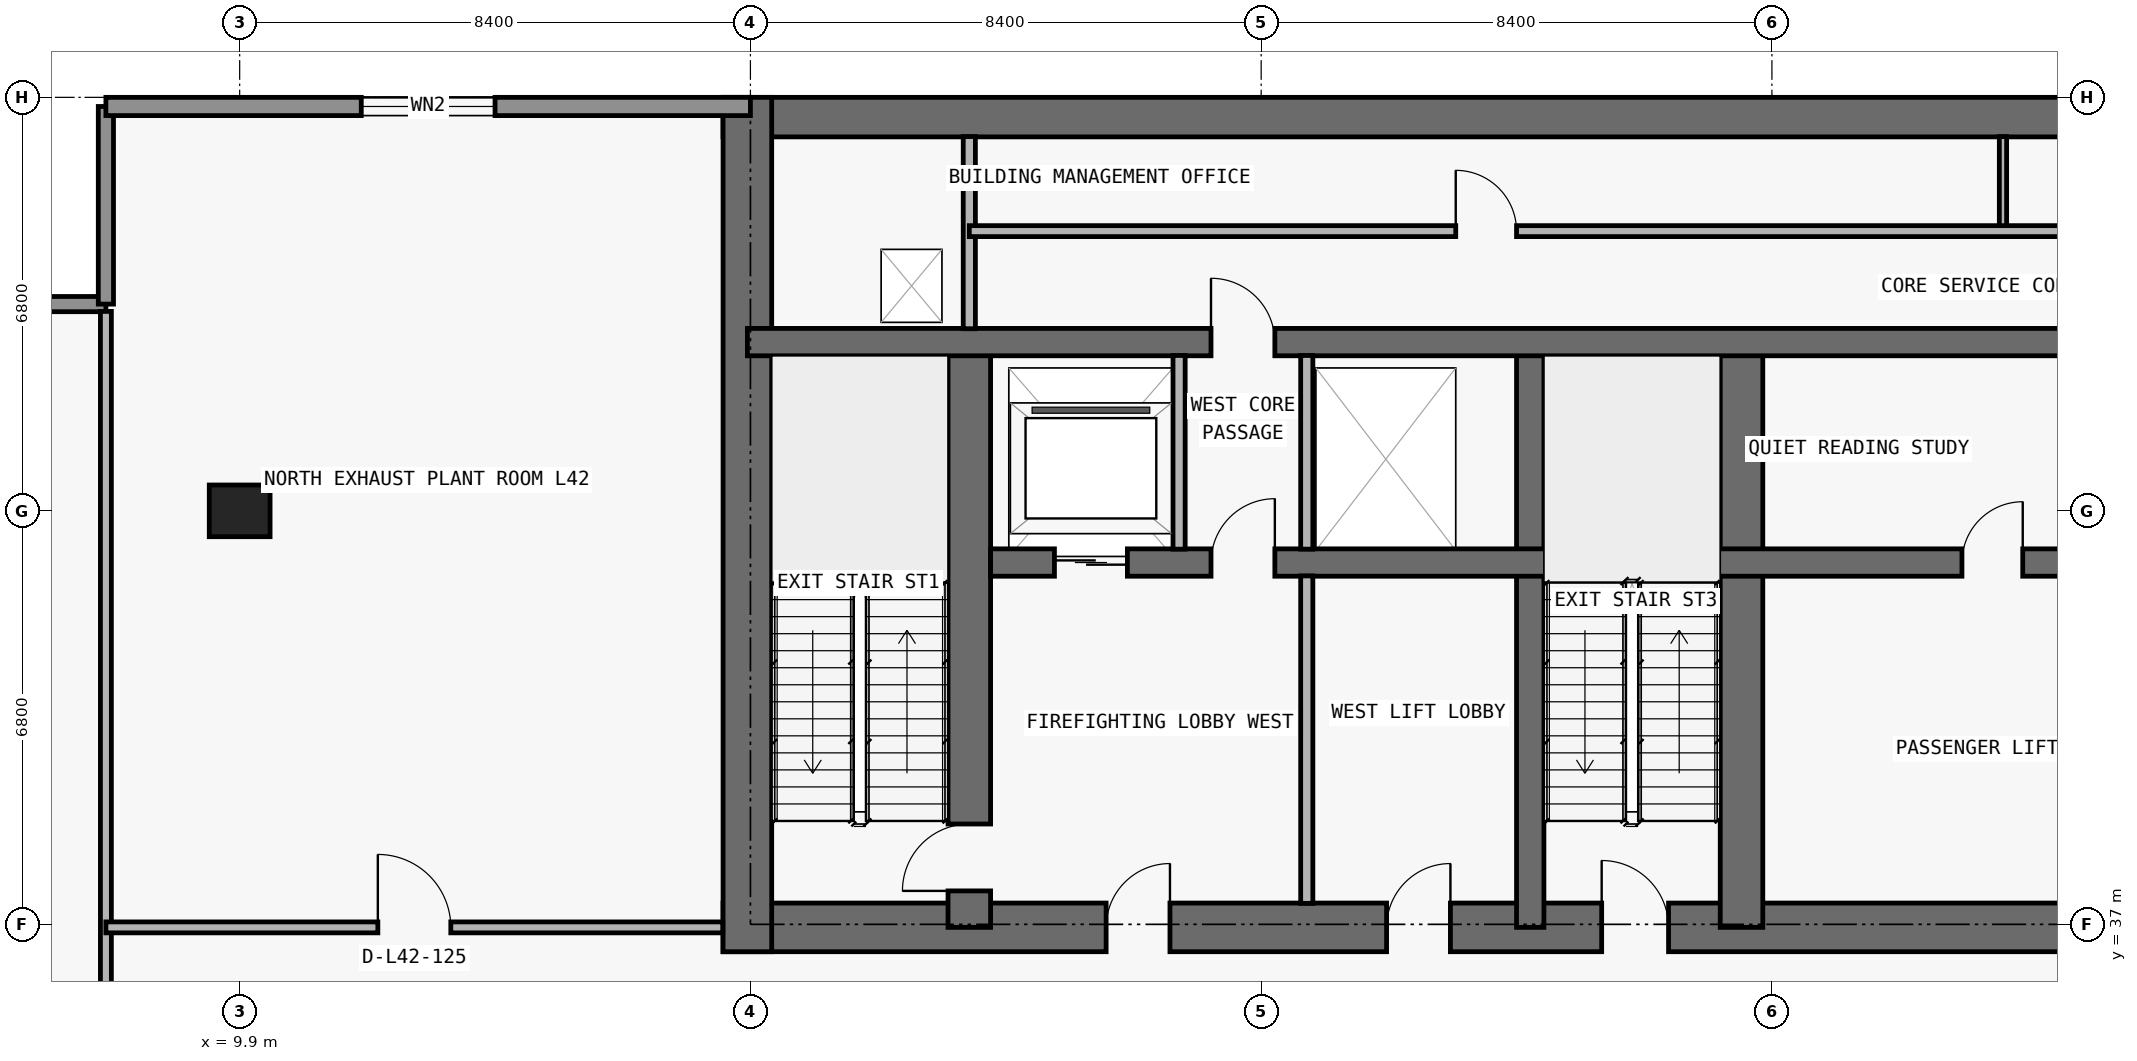
"""IFC4 building model, lengths in metres.
Left out: names, types, materials, properties, quantities, classifications, styles, units other than length and angle.
Written with IfcOpenShell. Run it as: python <this file> out.ifc"""

import sys

from ifc_helpers import new_model, si_unit, direction, frame, frame_2d, origin, origin_2d, place, context, subcontext, project, spatial, rectangle, extrude, element, fill, save


model = new_model("IFC4")
c1 = context("Model", 3, precision=1e-05, world=origin(), true_north=direction((0.0, 1.0)))
c2 = subcontext(c1, "Body", "Model", "MODEL_VIEW")
j1 = project(units=[si_unit("LENGTHUNIT", "METRE"), si_unit("PLANEANGLEUNIT", "RADIAN")], contexts=[c1])
p1 = place(None, origin())
s1 = spatial("IfcSite", under=j1, at=p1, CompositionType="ELEMENT")
p2 = place(p1, origin())
s2 = spatial("IfcBuilding", under=s1, at=p2, CompositionType="ELEMENT")
p3 = place(p2, frame((0.0, 0.0, 152.1)))
s3 = spatial("IfcBuildingStorey", under=s2, at=p3, CompositionType="ELEMENT", Elevation=152.1)
p4 = place(p3, frame((9.9, 43.8, 0.0), z_axis=(0.0, 0.0, 1.0), x_axis=(1.0, 0.0, 0.0)))
e1 = element("IfcColumn", 1, at=p4, inside=s3, PredefinedType="COLUMN", context=c2, shape_type="SweptSolid", body=[
    extrude(rectangle(XDim=1.0, YDim=0.85, at=origin_2d()), origin(), (0.0, 0.0, 1.0), 4.85),
])
p5 = place(p3, frame((17.85, 36.95, 0.0), z_axis=(0.0, 0.0, 1.0), x_axis=(1.0, 0.0, 0.0)))
e2 = element("IfcWall", 2, at=p5, inside=s3, PredefinedType="SHEAR", context=c2, shape_type="SweptSolid", body=[
    extrude(rectangle(XDim=42.1, YDim=0.8, at=frame_2d((21.05, 0.0))), origin(), (0.0, 0.0, 1.0), 4.85),
])
p6 = place(p5, frame((14.45, 0.0, 0.0)))
e3 = element("IfcOpeningElement", 3, at=p6, cuts=e2, PredefinedType="OPENING", context=c2, shape_type="SweptSolid", body=[
    extrude(rectangle(XDim=1.1, YDim=2.15, at=frame_2d((0.55, 1.075))), frame((0.0, 0.41, 0.0), z_axis=(0.0, -1.0, 0.0), x_axis=(1.0, 0.0, 0.0)), (0.0, 0.0, 1.0), 0.82),
])
p7 = place(p5, frame((6.3, 0.0, 0.0)))
e4 = element("IfcOpeningElement", 4, at=p7, cuts=e2, PredefinedType="OPENING", context=c2, shape_type="SweptSolid", body=[
    extrude(rectangle(XDim=1.05, YDim=2.15, at=frame_2d((0.525, 1.075))), frame((0.0, 0.41, 0.0), z_axis=(0.0, -1.0, 0.0), x_axis=(1.0, 0.0, 0.0)), (0.0, 0.0, 1.0), 0.82),
])
p8 = place(p5, frame((34.8, 0.0, 0.0)))
e5 = element("IfcOpeningElement", 5, at=p8, cuts=e2, PredefinedType="OPENING", context=c2, shape_type="SweptSolid", body=[
    extrude(rectangle(XDim=1.05, YDim=2.15, at=frame_2d((0.525, 1.075))), frame((0.0, 0.41, 0.0), z_axis=(0.0, -1.0, 0.0), x_axis=(1.0, 0.0, 0.0)), (0.0, 0.0, 1.0), 0.82),
])
p9 = place(p5, frame((10.913, 0.0, 0.0)))
e6 = element("IfcOpeningElement", 6, at=p9, cuts=e2, PredefinedType="OPENING", context=c2, shape_type="SweptSolid", body=[
    extrude(rectangle(XDim=1.05, YDim=2.15, at=frame_2d((0.525, 1.075))), frame((0.0, 0.41, 0.0), z_axis=(0.0, -1.0, 0.0), x_axis=(1.0, 0.0, 0.0)), (0.0, 0.0, 1.0), 0.82),
])
p10 = place(p5, frame((24.15, 0.0, 0.0)))
e7 = element("IfcOpeningElement", 7, at=p10, cuts=e2, PredefinedType="OPENING", context=c2, shape_type="SweptSolid", body=[
    extrude(rectangle(XDim=1.05, YDim=2.15, at=frame_2d((0.525, 1.075))), frame((0.0, 0.41, 0.0), z_axis=(0.0, -1.0, 0.0), x_axis=(1.0, 0.0, 0.0)), (0.0, 0.0, 1.0), 0.82),
])
p11 = place(p3, frame((17.85, 50.275, 0.0), z_axis=(0.0, 0.0, 1.0), x_axis=(1.0, 0.0, 0.0)))
e8 = element("IfcWall", 8, at=p11, inside=s3, PredefinedType="SHEAR", context=c2, shape_type="SweptSolid", body=[
    extrude(rectangle(XDim=42.1, YDim=0.65, at=frame_2d((21.05, 0.0))), origin(), (0.0, 0.0, 1.0), 4.85),
])
p12 = place(p3, frame((18.25, 36.55, 0.0), z_axis=(0.0, 0.0, 1.0), x_axis=(0.0, 1.0, 0.0)))
e9 = element("IfcWall", 9, at=p12, inside=s3, PredefinedType="SHEAR", context=c2, shape_type="SweptSolid", body=[
    extrude(rectangle(XDim=14.05, YDim=0.8, at=frame_2d((7.025, 0.0))), origin(), (0.0, 0.0, 1.0), 4.85),
])
p13 = place(p3, frame((21.9, 36.95, 0.0), z_axis=(0.0, 0.0, 1.0), x_axis=(0.0, 1.0, 0.0)))
e10 = element("IfcWall", 10, at=p13, inside=s3, PredefinedType="SHEAR", context=c2, shape_type="SweptSolid", body=[
    extrude(rectangle(XDim=9.625, YDim=0.7, at=frame_2d((4.812, 0.0))), origin(), (0.0, 0.0, 1.0), 4.85),
])
p14 = place(p13, frame((0.6, 0.0, 0.0)))
e11 = element("IfcOpeningElement", 11, at=p14, cuts=e10, PredefinedType="OPENING", context=c2, shape_type="SweptSolid", body=[
    extrude(rectangle(XDim=1.1, YDim=2.15, at=frame_2d((0.55, 1.075))), frame((0.0, 0.36, 0.0), z_axis=(0.0, -1.0, 0.0), x_axis=(1.0, 0.0, 0.0)), (0.0, 0.0, 1.0), 0.72),
])
p15 = place(p3, frame((31.125, 36.95, 0.0), z_axis=(0.0, 0.0, 1.0), x_axis=(0.0, 1.0, 0.0)))
e12 = element("IfcWall", 12, at=p15, inside=s3, PredefinedType="SHEAR", context=c2, shape_type="SweptSolid", body=[
    extrude(rectangle(XDim=9.625, YDim=0.45, at=frame_2d((4.812, 0.0))), origin(), (0.0, 0.0, 1.0), 4.85),
])
p16 = place(p3, frame((34.6, 36.95, 0.0), z_axis=(0.0, 0.0, 1.0), x_axis=(0.0, 1.0, 0.0)))
e13 = element("IfcWall", 13, at=p16, inside=s3, PredefinedType="SHEAR", context=c2, shape_type="SweptSolid", body=[
    extrude(rectangle(XDim=9.625, YDim=0.7, at=frame_2d((4.812, 0.0))), origin(), (0.0, 0.0, 1.0), 4.85),
])
p17 = place(p3, frame((22.25, 42.95, 0.0), z_axis=(0.0, 0.0, 1.0), x_axis=(1.0, 0.0, 0.0)))
e14 = element("IfcWall", 14, at=p17, inside=s3, PredefinedType="SHEAR", context=c2, shape_type="SweptSolid", body=[
    extrude(rectangle(XDim=33.3, YDim=0.45, at=frame_2d((16.65, 0.0))), origin(), (0.0, 0.0, 1.0), 4.85),
])
p18 = place(p17, frame((1.05, 0.0, 0.0)))
e15 = element("IfcOpeningElement", 15, at=p18, cuts=e14, PredefinedType="OPENING", context=c2, shape_type="SweptSolid", body=[
    extrude(rectangle(XDim=1.2, YDim=2.2, at=frame_2d((0.6, 1.1))), frame((0.0, 0.235, 0.0), z_axis=(0.0, -1.0, 0.0), x_axis=(1.0, 0.0, 0.0)), (0.0, 0.0, 1.0), 0.47),
])
p19 = place(p17, frame((31.05, 0.0, 0.0)))
e16 = element("IfcOpeningElement", 16, at=p19, cuts=e14, PredefinedType="OPENING", context=c2, shape_type="SweptSolid", body=[
    extrude(rectangle(XDim=1.2, YDim=2.2, at=frame_2d((0.6, 1.1))), frame((0.0, 0.235, 0.0), z_axis=(0.0, -1.0, 0.0), x_axis=(1.0, 0.0, 0.0)), (0.0, 0.0, 1.0), 0.47),
])
p20 = place(p17, frame((21.4, 0.0, 0.0)))
e17 = element("IfcOpeningElement", 17, at=p20, cuts=e14, PredefinedType="OPENING", context=c2, shape_type="SweptSolid", body=[
    extrude(rectangle(XDim=1.1, YDim=2.2, at=frame_2d((0.55, 1.1))), frame((0.0, 0.235, 0.0), z_axis=(0.0, -1.0, 0.0), x_axis=(1.0, 0.0, 0.0)), (0.0, 0.0, 1.0), 0.47),
])
p21 = place(p17, frame((24.0, 0.0, 0.0)))
e18 = element("IfcOpeningElement", 18, at=p21, cuts=e14, PredefinedType="OPENING", context=c2, shape_type="SweptSolid", body=[
    extrude(rectangle(XDim=1.1, YDim=2.2, at=frame_2d((0.55, 1.1))), frame((0.0, 0.235, 0.0), z_axis=(0.0, -1.0, 0.0), x_axis=(1.0, 0.0, 0.0)), (0.0, 0.0, 1.0), 0.47),
])
p22 = place(p17, frame((3.625, 0.0, 0.0)))
e19 = element("IfcOpeningElement", 19, at=p22, cuts=e14, PredefinedType="OPENING", context=c2, shape_type="SweptSolid", body=[
    extrude(rectangle(XDim=1.05, YDim=2.15, at=frame_2d((0.525, 1.075))), frame((0.0, 0.235, 0.0), z_axis=(0.0, -1.0, 0.0), x_axis=(1.0, 0.0, 0.0)), (0.0, 0.0, 1.0), 0.47),
])
p23 = place(p17, frame((28.675, 0.0, 0.0)))
e20 = element("IfcOpeningElement", 20, at=p23, cuts=e14, PredefinedType="OPENING", context=c2, shape_type="SweptSolid", body=[
    extrude(rectangle(XDim=1.05, YDim=2.15, at=frame_2d((0.525, 1.075))), frame((0.0, 0.235, 0.0), z_axis=(0.0, -1.0, 0.0), x_axis=(1.0, 0.0, 0.0)), (0.0, 0.0, 1.0), 0.47),
])
p24 = place(p17, frame((15.975, 0.0, 0.0)))
e21 = element("IfcOpeningElement", 21, at=p24, cuts=e14, PredefinedType="OPENING", context=c2, shape_type="SweptSolid", body=[
    extrude(rectangle(XDim=1.0, YDim=2.2, at=frame_2d((0.5, 1.1))), frame((0.0, 0.235, 0.0), z_axis=(0.0, -1.0, 0.0), x_axis=(1.0, 0.0, 0.0)), (0.0, 0.0, 1.0), 0.47),
])
p25 = place(p3, frame((18.25, 46.575, 0.0), z_axis=(0.0, 0.0, 1.0), x_axis=(1.0, 0.0, 0.0)))
e22 = element("IfcWall", 22, at=p25, inside=s3, PredefinedType="SHEAR", context=c2, shape_type="SweptSolid", body=[
    extrude(rectangle(XDim=41.3, YDim=0.45, at=frame_2d((20.65, 0.0))), origin(), (0.0, 0.0, 1.0), 4.85),
])
p26 = place(p25, frame((7.625, 0.0, 0.0)))
e23 = element("IfcOpeningElement", 23, at=p26, cuts=e22, PredefinedType="OPENING", context=c2, shape_type="SweptSolid", body=[
    extrude(rectangle(XDim=1.05, YDim=2.15, at=frame_2d((0.525, 1.075))), frame((0.0, 0.235, 0.0), z_axis=(0.0, -1.0, 0.0), x_axis=(1.0, 0.0, 0.0)), (0.0, 0.0, 1.0), 0.47),
])
p27 = place(p25, frame((32.675, 0.0, 0.0)))
e24 = element("IfcOpeningElement", 24, at=p27, cuts=e22, PredefinedType="OPENING", context=c2, shape_type="SweptSolid", body=[
    extrude(rectangle(XDim=1.05, YDim=2.15, at=frame_2d((0.525, 1.075))), frame((0.0, 0.235, 0.0), z_axis=(0.0, -1.0, 0.0), x_axis=(1.0, 0.0, 0.0)), (0.0, 0.0, 1.0), 0.47),
])
p28 = place(p3, frame((4.05, 47.2, 0.0), z_axis=(0.0, 0.0, 1.0), x_axis=(1.0, 0.0, 0.0)))
e25 = element("IfcWall", 25, at=p28, inside=s3, PredefinedType="ELEMENTEDWALL", context=c2, shape_type="SweptSolid", body=[
    extrude(rectangle(XDim=3.65, YDim=0.25, at=frame_2d((1.825, 0.0))), origin(), (0.0, 0.0, 1.0), 4.85),
])
p29 = place(p3, frame((7.7, 47.2, 0.0), z_axis=(0.0, 0.0, 1.0), x_axis=(0.0, 1.0, 0.0)))
e26 = element("IfcWall", 26, at=p29, inside=s3, PredefinedType="ELEMENTEDWALL", context=c2, shape_type="SweptSolid", body=[
    extrude(rectangle(XDim=3.25, YDim=0.25, at=frame_2d((1.625, 0.0))), origin(), (0.0, 0.0, 1.0), 4.85),
])
p30 = place(p3, frame((7.7, 50.45, 0.0), z_axis=(0.0, 0.0, 1.0), x_axis=(1.0, 0.0, 0.0)))
e27 = element("IfcWall", 27, at=p30, inside=s3, PredefinedType="STANDARD", context=c2, shape_type="SweptSolid", body=[
    extrude(rectangle(XDim=10.6, YDim=0.3, at=frame_2d((5.3, 0.0))), origin(), (0.0, 0.0, 1.0), 4.85),
])
p31 = place(p30, frame((4.2, 0.0, 0.85)))
e28 = element("IfcOpeningElement", 28, at=p31, cuts=e27, PredefinedType="OPENING", context=c2, shape_type="SweptSolid", body=[
    extrude(rectangle(XDim=2.2, YDim=1.55, at=frame_2d((1.1, 0.775))), frame((0.0, 0.16, 0.0), z_axis=(0.0, -1.0, 0.0), x_axis=(1.0, 0.0, 0.0)), (0.0, 0.0, 1.0), 0.32),
])
p32 = place(p3, frame((7.7, 12.9, 0.0), z_axis=(0.0, 0.0, 1.0), x_axis=(0.0, 1.0, 0.0)))
e29 = element("IfcWall", 29, at=p32, inside=s3, PredefinedType="PARTITIONING", context=c2, shape_type="SweptSolid", body=[
    extrude(rectangle(XDim=34.18, YDim=0.18, at=frame_2d((17.09, 0.0))), origin(), (0.0, 0.0, 1.0), 4.85),
])
p33 = place(p3, frame((21.9, 46.795, 0.0), z_axis=(0.0, 0.0, 1.0), x_axis=(0.0, 1.0, 0.0)))
e30 = element("IfcWall", 30, at=p33, inside=s3, PredefinedType="PARTITIONING", context=c2, shape_type="SweptSolid", body=[
    extrude(rectangle(XDim=3.16, YDim=0.2, at=frame_2d((1.58, 0.0))), origin(), (0.0, 0.0, 1.0), 4.85),
])
p34 = place(p3, frame((25.35, 43.17, 0.0), z_axis=(0.0, 0.0, 1.0), x_axis=(0.0, 1.0, 0.0)))
e31 = element("IfcWall", 31, at=p34, inside=s3, PredefinedType="PARTITIONING", context=c2, shape_type="SweptSolid", body=[
    extrude(rectangle(XDim=3.185, YDim=0.2, at=frame_2d((1.593, 0.0))), origin(), (0.0, 0.0, 1.0), 4.85),
])
p35 = place(p3, frame((27.45, 37.345, 0.0), z_axis=(0.0, 0.0, 1.0), x_axis=(0.0, 1.0, 0.0)))
e32 = element("IfcWall", 32, at=p35, inside=s3, PredefinedType="PARTITIONING", context=c2, shape_type="SweptSolid", body=[
    extrude(rectangle(XDim=5.385, YDim=0.2, at=frame_2d((2.692, 0.0))), origin(), (0.0, 0.0, 1.0), 4.85),
])
p36 = place(p3, frame((27.45, 43.17, 0.0), z_axis=(0.0, 0.0, 1.0), x_axis=(0.0, 1.0, 0.0)))
e33 = element("IfcWall", 33, at=p36, inside=s3, PredefinedType="PARTITIONING", context=c2, shape_type="SweptSolid", body=[
    extrude(rectangle(XDim=3.185, YDim=0.2, at=frame_2d((1.593, 0.0))), origin(), (0.0, 0.0, 1.0), 4.85),
])
p37 = place(p3, frame((38.9, 48.4, 0.0), z_axis=(0.0, 0.0, 1.0), x_axis=(0.0, 1.0, 0.0)))
e34 = element("IfcWall", 34, at=p37, inside=s3, PredefinedType="PARTITIONING", context=c2, shape_type="SweptSolid", body=[
    extrude(rectangle(XDim=1.555, YDim=0.12, at=frame_2d((0.778, 0.0))), origin(), (0.0, 0.0, 1.0), 4.85),
])
p38 = place(p3, frame((7.7, 36.95, 0.0), z_axis=(0.0, 0.0, 1.0), x_axis=(1.0, 0.0, 0.0)))
e35 = element("IfcWall", 35, at=p38, inside=s3, PredefinedType="PARTITIONING", context=c2, shape_type="SweptSolid", body=[
    extrude(rectangle(XDim=10.145, YDim=0.18, at=frame_2d((5.073, 0.0))), origin(), (0.0, 0.0, 1.0), 4.85),
])
p39 = place(p38, frame((4.472, 0.0, 0.0)))
e36 = element("IfcOpeningElement", 36, at=p39, cuts=e35, PredefinedType="OPENING", context=c2, shape_type="SweptSolid", body=[
    extrude(rectangle(XDim=1.2, YDim=2.2, at=frame_2d((0.6, 1.1))), frame((0.0, 0.1, 0.0), z_axis=(0.0, -1.0, 0.0), x_axis=(1.0, 0.0, 0.0)), (0.0, 0.0, 1.0), 0.2),
])
p40 = place(p3, frame((21.9, 48.4, 0.0), z_axis=(0.0, 0.0, 1.0), x_axis=(1.0, 0.0, 0.0)))
e37 = element("IfcWall", 37, at=p40, inside=s3, PredefinedType="PARTITIONING", context=c2, shape_type="SweptSolid", body=[
    extrude(rectangle(XDim=34.0, YDim=0.18, at=frame_2d((17.0, 0.0))), origin(), (0.0, 0.0, 1.0), 4.85),
])
p41 = place(p40, frame((8.0, 0.0, 0.0)))
e38 = element("IfcOpeningElement", 38, at=p41, cuts=e37, PredefinedType="OPENING", context=c2, shape_type="SweptSolid", body=[
    extrude(rectangle(XDim=1.0, YDim=2.2, at=frame_2d((0.5, 1.1))), frame((0.0, 0.1, 0.0), z_axis=(0.0, -1.0, 0.0), x_axis=(1.0, 0.0, 0.0)), (0.0, 0.0, 1.0), 0.2),
])
p42 = place(p40, frame((25.0, 0.0, 0.0)))
e39 = element("IfcOpeningElement", 39, at=p42, cuts=e37, PredefinedType="OPENING", context=c2, shape_type="SweptSolid", body=[
    extrude(rectangle(XDim=1.0, YDim=2.2, at=frame_2d((0.5, 1.1))), frame((0.0, 0.1, 0.0), z_axis=(0.0, -1.0, 0.0), x_axis=(1.0, 0.0, 0.0)), (0.0, 0.0, 1.0), 0.2),
])
p43 = place(p31, origin())
e40 = element("IfcWindow", 40, at=p43, inside=s3, PartitioningType="SINGLE_PANEL", PredefinedType="WINDOW", context=c2, shape_type="SweptSolid", body=[
    extrude(rectangle(XDim=2.2, YDim=1.55, at=frame_2d((1.1, 0.775))), frame((0.0, 0.03, 0.0), z_axis=(0.0, -1.0, 0.0), x_axis=(1.0, 0.0, 0.0)), (0.0, 0.0, 1.0), 0.06),
])
fill(e28, e40)
p44 = place(p18, origin())
e41 = element("IfcDoor", 41, at=p44, inside=s3, OperationType="DOUBLE_DOOR_SLIDING", PredefinedType="DOOR", context=c2, shape_type="SweptSolid", body=[
    extrude(rectangle(XDim=1.2, YDim=2.2, at=frame_2d((0.6, 1.1))), frame((0.0, 0.025, 0.0), z_axis=(0.0, -1.0, 0.0), x_axis=(1.0, 0.0, 0.0)), (0.0, 0.0, 1.0), 0.05),
])
fill(e15, e41)
p45 = place(p6, origin())
e42 = element("IfcDoor", 42, at=p45, inside=s3, OperationType="SINGLE_SWING_LEFT", PredefinedType="DOOR", context=c2, shape_type="SweptSolid", body=[
    extrude(rectangle(XDim=1.1, YDim=2.15, at=frame_2d((0.55, 1.075))), frame((0.0, 0.025, 0.0), z_axis=(0.0, -1.0, 0.0), x_axis=(1.0, 0.0, 0.0)), (0.0, 0.0, 1.0), 0.05),
])
fill(e3, e42)
p46 = place(p7, origin())
e43 = element("IfcDoor", 43, at=p46, inside=s3, OperationType="SINGLE_SWING_RIGHT", PredefinedType="DOOR", context=c2, shape_type="SweptSolid", body=[
    extrude(rectangle(XDim=1.05, YDim=2.15, at=frame_2d((0.525, 1.075))), frame((0.0, 0.025, 0.0), z_axis=(0.0, -1.0, 0.0), x_axis=(1.0, 0.0, 0.0)), (0.0, 0.0, 1.0), 0.05),
])
fill(e4, e43)
p47 = place(p14, origin())
e44 = element("IfcDoor", 44, at=p47, inside=s3, OperationType="SINGLE_SWING_LEFT", PredefinedType="DOOR", context=c2, shape_type="SweptSolid", body=[
    extrude(rectangle(XDim=1.1, YDim=2.15, at=frame_2d((0.55, 1.075))), frame((0.0, 0.025, 0.0), z_axis=(0.0, -1.0, 0.0), x_axis=(1.0, 0.0, 0.0)), (0.0, 0.0, 1.0), 0.05),
])
fill(e11, e44)
p48 = place(p22, origin())
e45 = element("IfcDoor", 45, at=p48, inside=s3, OperationType="SINGLE_SWING_RIGHT", PredefinedType="DOOR", context=c2, shape_type="SweptSolid", body=[
    extrude(rectangle(XDim=1.05, YDim=2.15, at=frame_2d((0.525, 1.075))), frame((0.0, 0.025, 0.0), z_axis=(0.0, -1.0, 0.0), x_axis=(1.0, 0.0, 0.0)), (0.0, 0.0, 1.0), 0.05),
])
fill(e19, e45)
p49 = place(p9, origin())
e46 = element("IfcDoor", 46, at=p49, inside=s3, OperationType="SINGLE_SWING_RIGHT", PredefinedType="DOOR", context=c2, shape_type="SweptSolid", body=[
    extrude(rectangle(XDim=1.05, YDim=2.15, at=frame_2d((0.525, 1.075))), frame((0.0, 0.025, 0.0), z_axis=(0.0, -1.0, 0.0), x_axis=(1.0, 0.0, 0.0)), (0.0, 0.0, 1.0), 0.05),
])
fill(e6, e46)
p50 = place(p24, origin())
e47 = element("IfcDoor", 47, at=p50, inside=s3, OperationType="SINGLE_SWING_RIGHT", PredefinedType="DOOR", context=c2, shape_type="SweptSolid", body=[
    extrude(rectangle(XDim=1.0, YDim=2.2, at=frame_2d((0.5, 1.1))), frame((0.0, 0.025, 0.0), z_axis=(0.0, -1.0, 0.0), x_axis=(1.0, 0.0, 0.0)), (0.0, 0.0, 1.0), 0.05),
])
fill(e21, e47)
p51 = place(p26, origin())
e48 = element("IfcDoor", 48, at=p51, inside=s3, OperationType="SINGLE_SWING_LEFT", PredefinedType="DOOR", context=c2, shape_type="SweptSolid", body=[
    extrude(rectangle(XDim=1.05, YDim=2.15, at=frame_2d((0.525, 1.075))), frame((0.0, 0.025, 0.0), z_axis=(0.0, -1.0, 0.0), x_axis=(1.0, 0.0, 0.0)), (0.0, 0.0, 1.0), 0.05),
])
fill(e23, e48)
p52 = place(p41, origin())
e49 = element("IfcDoor", 49, at=p52, inside=s3, OperationType="SINGLE_SWING_LEFT", PredefinedType="DOOR", context=c2, shape_type="SweptSolid", body=[
    extrude(rectangle(XDim=1.0, YDim=2.2, at=frame_2d((0.5, 1.1))), frame((0.0, 0.025, 0.0), z_axis=(0.0, -1.0, 0.0), x_axis=(1.0, 0.0, 0.0)), (0.0, 0.0, 1.0), 0.05),
])
fill(e38, e49)
p53 = place(p39, origin())
e50 = element("IfcDoor", 50, at=p53, inside=s3, OperationType="SINGLE_SWING_LEFT", PredefinedType="DOOR", context=c2, shape_type="SweptSolid", body=[
    extrude(rectangle(XDim=1.2, YDim=2.2, at=frame_2d((0.6, 1.1))), frame((0.0, 0.025, 0.0), z_axis=(0.0, -1.0, 0.0), x_axis=(1.0, 0.0, 0.0)), (0.0, 0.0, 1.0), 0.05),
])
fill(e36, e50)
save(model, sys.argv[1])
